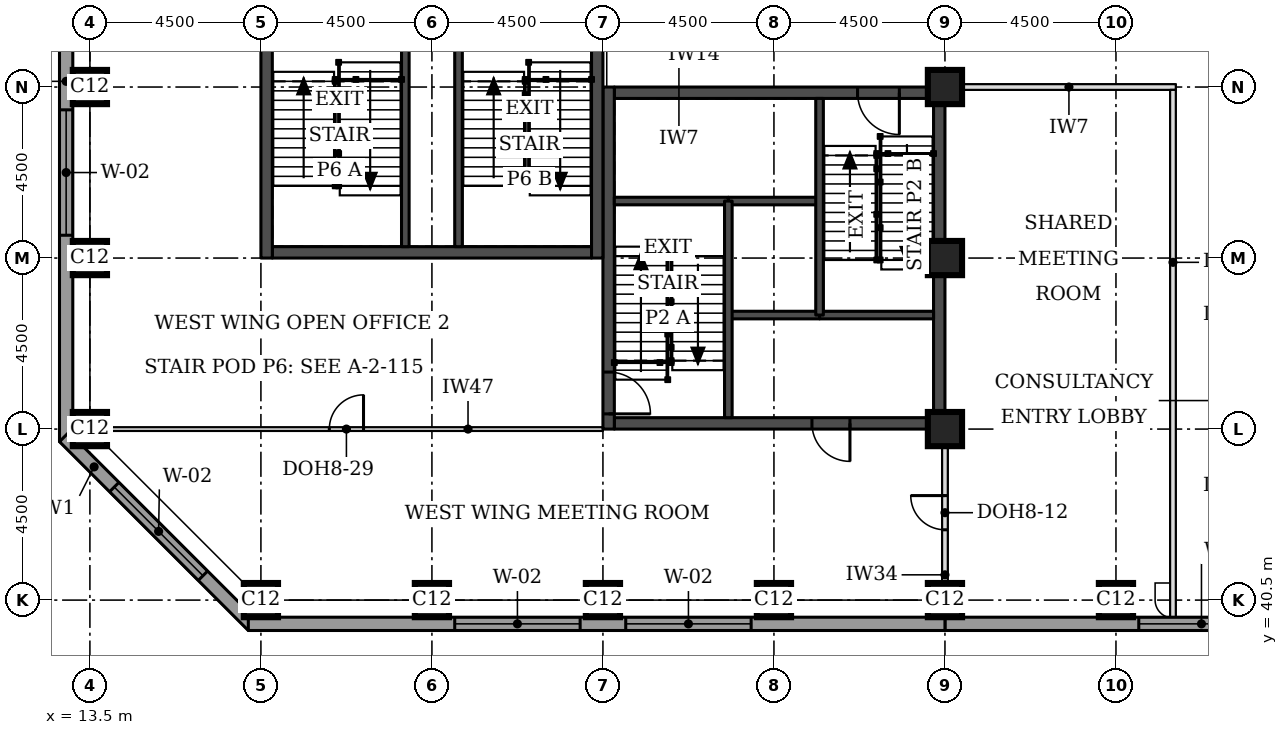
"""IFC4 building model, lengths in metres.
Left out: names, types, materials, properties, quantities, classifications, styles, units other than length and angle.
Written with IfcOpenShell. Run it as: python <this file> out.ifc"""

import sys

from ifc_helpers import new_model, si_unit, direction, frame, frame_2d, origin, origin_2d, place, context, subcontext, project, spatial, rectangle, extrude, element, fill, save


model = new_model("IFC4")
c1 = context("Model", 3, precision=1e-05, world=origin(), true_north=direction((0.0, 1.0)))
c2 = subcontext(c1, "Body", "Model", "MODEL_VIEW")
j1 = project(units=[si_unit("LENGTHUNIT", "METRE"), si_unit("PLANEANGLEUNIT", "RADIAN")], contexts=[c1])
p1 = place(None, origin())
s1 = spatial("IfcSite", under=j1, at=p1, CompositionType="ELEMENT")
p2 = place(p1, origin())
s2 = spatial("IfcBuilding", under=s1, at=p2, CompositionType="ELEMENT")
p3 = place(p2, frame((0.0, 0.0, 203.2)))
s3 = spatial("IfcBuildingStorey", under=s2, at=p3, CompositionType="ELEMENT", Elevation=203.2)
for number, where, z_axis, x_axis in (
    (1, (18.0, 40.5, 0.0), (0.0, 0.0, 1.0), (1.0, 0.0, 0.0)),
    (2, (22.5, 40.5, 0.0), (0.0, 0.0, 1.0), (1.0, 0.0, 0.0)),
    (3, (27.0, 40.5, 0.0), (0.0, 0.0, 1.0), (1.0, 0.0, 0.0)),
    (4, (31.5, 40.5, 0.0), (0.0, 0.0, 1.0), (1.0, 0.0, 0.0)),
    (5, (36.0, 40.5, 0.0), (0.0, 0.0, 1.0), (1.0, 0.0, 0.0)),
    (6, (40.5, 40.5, 0.0), (0.0, 0.0, 1.0), (1.0, 0.0, 0.0)),
    (7, (13.5, 45.0, 0.0), (0.0, 0.0, 1.0), (1.0, 0.0, 0.0)),
    (8, (36.0, 45.0, 0.0), (0.0, 0.0, 1.0), (1.0, 0.0, 0.0)),
    (9, (13.5, 49.5, 0.0), (0.0, 0.0, 1.0), (1.0, 0.0, 0.0)),
    (10, (36.0, 49.5, 0.0), (0.0, 0.0, 1.0), (1.0, 0.0, 0.0)),
    (11, (13.5, 54.0, 0.0), (0.0, 0.0, 1.0), (1.0, 0.0, 0.0)),
    (12, (36.0, 54.0, 0.0), (0.0, 0.0, 1.0), (1.0, 0.0, 0.0)),
):
    element("IfcColumn", number, at=place(p3, frame(where, z_axis=z_axis, x_axis=x_axis)), inside=s3, PredefinedType="COLUMN", context=c2, shape_type="SweptSolid", body=[
        extrude(rectangle(XDim=0.9, YDim=0.9, at=origin_2d()), origin(), (0.0, 0.0, 1.0), 3.7),
    ])
p4 = place(p3, frame((27.3, 45.15, 0.0), z_axis=(0.0, 0.0, 1.0), x_axis=(1.0, 0.0, 0.0)))
e13 = element("IfcWall", 13, at=p4, inside=s3, PredefinedType="SHEAR", context=c2, shape_type="SweptSolid", body=[
    extrude(rectangle(XDim=8.4, YDim=0.3, at=frame_2d((4.2, 0.0))), origin(), (0.0, 0.0, 1.0), 3.7),
])
p5 = place(p4, frame((5.2, 0.0, 0.0)))
e14 = element("IfcOpeningElement", 14, at=p5, cuts=e13, PredefinedType="OPENING", context=c2, shape_type="SweptSolid", body=[
    extrude(rectangle(XDim=1.0, YDim=2.1, at=frame_2d((0.5, 1.05))), frame((0.0, 0.16, 0.0), z_axis=(0.0, -1.0, 0.0), x_axis=(1.0, 0.0, 0.0)), (0.0, 0.0, 1.0), 0.32),
])
p6 = place(p3, frame((27.3, 53.85, 0.0), z_axis=(0.0, 0.0, 1.0), x_axis=(1.0, 0.0, 0.0)))
e15 = element("IfcWall", 15, at=p6, inside=s3, PredefinedType="SHEAR", context=c2, shape_type="SweptSolid", body=[
    extrude(rectangle(XDim=8.4, YDim=0.3, at=frame_2d((4.2, 0.0))), origin(), (0.0, 0.0, 1.0), 3.7),
])
p7 = place(p6, frame((6.4, 0.0, 0.0)))
e16 = element("IfcOpeningElement", 16, at=p7, cuts=e15, PredefinedType="OPENING", context=c2, shape_type="SweptSolid", body=[
    extrude(rectangle(XDim=1.1, YDim=2.1, at=frame_2d((0.55, 1.05))), frame((0.0, 0.16, 0.0), z_axis=(0.0, -1.0, 0.0), x_axis=(1.0, 0.0, 0.0)), (0.0, 0.0, 1.0), 0.32),
])
p8 = place(p3, frame((27.15, 45.0, 0.0), z_axis=(0.0, 0.0, 1.0), x_axis=(0.0, 1.0, 0.0)))
e17 = element("IfcWall", 17, at=p8, inside=s3, PredefinedType="SHEAR", context=c2, shape_type="SweptSolid", body=[
    extrude(rectangle(XDim=9.0, YDim=0.3, at=frame_2d((4.5, 0.0))), origin(), (0.0, 0.0, 1.0), 3.7),
])
p9 = place(p8, frame((0.4, 0.0, 0.0)))
e18 = element("IfcOpeningElement", 18, at=p9, cuts=e17, PredefinedType="OPENING", context=c2, shape_type="SweptSolid", body=[
    extrude(rectangle(XDim=1.1, YDim=2.1, at=frame_2d((0.55, 1.05))), frame((0.0, 0.16, 0.0), z_axis=(0.0, -1.0, 0.0), x_axis=(1.0, 0.0, 0.0)), (0.0, 0.0, 1.0), 0.32),
])
p10 = place(p3, frame((35.85, 45.0, 0.0), z_axis=(0.0, 0.0, 1.0), x_axis=(0.0, 1.0, 0.0)))
e19 = element("IfcWall", 19, at=p10, inside=s3, PredefinedType="SHEAR", context=c2, shape_type="SweptSolid", body=[
    extrude(rectangle(XDim=9.0, YDim=0.3, at=frame_2d((4.5, 0.0))), origin(), (0.0, 0.0, 1.0), 3.7),
])
p11 = place(p3, frame((18.3, 49.65, 0.0), z_axis=(0.0, 0.0, 1.0), x_axis=(1.0, 0.0, 0.0)))
e20 = element("IfcWall", 20, at=p11, inside=s3, PredefinedType="SHEAR", context=c2, shape_type="SweptSolid", body=[
    extrude(rectangle(XDim=8.4, YDim=0.3, at=frame_2d((4.2, 0.0))), origin(), (0.0, 0.0, 1.0), 3.7),
])
p12 = place(p3, frame((18.15, 49.5, 0.0), z_axis=(0.0, 0.0, 1.0), x_axis=(0.0, 1.0, 0.0)))
e21 = element("IfcWall", 21, at=p12, inside=s3, PredefinedType="SHEAR", context=c2, shape_type="SweptSolid", body=[
    extrude(rectangle(XDim=9.0, YDim=0.3, at=frame_2d((4.5, 0.0))), origin(), (0.0, 0.0, 1.0), 3.7),
])
p13 = place(p3, frame((26.85, 49.5, 0.0), z_axis=(0.0, 0.0, 1.0), x_axis=(0.0, 1.0, 0.0)))
e22 = element("IfcWall", 22, at=p13, inside=s3, PredefinedType="SHEAR", context=c2, shape_type="SweptSolid", body=[
    extrude(rectangle(XDim=9.0, YDim=0.3, at=frame_2d((4.5, 0.0))), origin(), (0.0, 0.0, 1.0), 3.7),
])
p14 = place(p13, frame((6.6, 0.0, 0.0)))
e23 = element("IfcOpeningElement", 23, at=p14, cuts=e22, PredefinedType="OPENING", context=c2, shape_type="SweptSolid", body=[
    extrude(rectangle(XDim=1.8, YDim=2.1, at=frame_2d((0.9, 1.05))), frame((0.0, 0.16, 0.0), z_axis=(0.0, -1.0, 0.0), x_axis=(1.0, 0.0, 0.0)), (0.0, 0.0, 1.0), 0.32),
])
p15 = place(p3, frame((36.0, 39.875, 0.0), z_axis=(0.0, 0.0, 1.0), x_axis=(1.0, 0.0, 0.0)))
e24 = element("IfcWall", 24, at=p15, inside=s3, PredefinedType="STANDARD", context=c2, shape_type="SweptSolid", body=[
    extrude(rectangle(XDim=36.331, YDim=0.35, at=frame_2d((18.166, 0.0))), origin(), (0.0, 0.0, 1.0), 3.525),
])
p16 = place(p15, frame((5.1, 0.0, 0.9)))
e25 = element("IfcOpeningElement", 25, at=p16, cuts=e24, PredefinedType="OPENING", context=c2, shape_type="SweptSolid", body=[
    extrude(rectangle(XDim=3.3, YDim=1.9, at=frame_2d((1.65, 0.95))), frame((0.0, 0.185, 0.0), z_axis=(0.0, -1.0, 0.0), x_axis=(1.0, 0.0, 0.0)), (0.0, 0.0, 1.0), 0.37),
])
p17 = place(p15, frame((9.6, 0.0, 0.9)))
e26 = element("IfcOpeningElement", 26, at=p17, cuts=e24, PredefinedType="OPENING", context=c2, shape_type="SweptSolid", body=[
    extrude(rectangle(XDim=3.3, YDim=1.9, at=frame_2d((1.65, 0.95))), frame((0.0, 0.185, 0.0), z_axis=(0.0, -1.0, 0.0), x_axis=(1.0, 0.0, 0.0)), (0.0, 0.0, 1.0), 0.37),
])
p18 = place(p15, frame((14.1, 0.0, 0.9)))
e27 = element("IfcOpeningElement", 27, at=p18, cuts=e24, PredefinedType="OPENING", context=c2, shape_type="SweptSolid", body=[
    extrude(rectangle(XDim=3.3, YDim=1.9, at=frame_2d((1.65, 0.95))), frame((0.0, 0.185, 0.0), z_axis=(0.0, -1.0, 0.0), x_axis=(1.0, 0.0, 0.0)), (0.0, 0.0, 1.0), 0.37),
])
p19 = place(p15, frame((18.6, 0.0, 0.9)))
e28 = element("IfcOpeningElement", 28, at=p19, cuts=e24, PredefinedType="OPENING", context=c2, shape_type="SweptSolid", body=[
    extrude(rectangle(XDim=3.3, YDim=1.9, at=frame_2d((1.65, 0.95))), frame((0.0, 0.185, 0.0), z_axis=(0.0, -1.0, 0.0), x_axis=(1.0, 0.0, 0.0)), (0.0, 0.0, 1.0), 0.37),
])
p20 = place(p15, frame((23.1, 0.0, 0.9)))
e29 = element("IfcOpeningElement", 29, at=p20, cuts=e24, PredefinedType="OPENING", context=c2, shape_type="SweptSolid", body=[
    extrude(rectangle(XDim=3.3, YDim=1.9, at=frame_2d((1.65, 0.95))), frame((0.0, 0.185, 0.0), z_axis=(0.0, -1.0, 0.0), x_axis=(1.0, 0.0, 0.0)), (0.0, 0.0, 1.0), 0.37),
])
p21 = place(p15, frame((27.6, 0.0, 0.9)))
e30 = element("IfcOpeningElement", 30, at=p21, cuts=e24, PredefinedType="OPENING", context=c2, shape_type="SweptSolid", body=[
    extrude(rectangle(XDim=3.3, YDim=1.9, at=frame_2d((1.65, 0.95))), frame((0.0, 0.185, 0.0), z_axis=(0.0, -1.0, 0.0), x_axis=(1.0, 0.0, 0.0)), (0.0, 0.0, 1.0), 0.37),
])
p22 = place(p3, frame((12.875, 58.831, 0.0), z_axis=(0.0, 0.0, 1.0), x_axis=(0.0, -1.0, 0.0)))
e31 = element("IfcWall", 31, at=p22, inside=s3, PredefinedType="STANDARD", context=c2, shape_type="SweptSolid", body=[
    extrude(rectangle(XDim=14.163, YDim=0.35, at=frame_2d((7.081, 0.0))), origin(), (0.0, 0.0, 1.0), 3.525),
])
p23 = place(p22, frame((5.431, 0.0, 0.9)))
e32 = element("IfcOpeningElement", 32, at=p23, cuts=e31, PredefinedType="OPENING", context=c2, shape_type="SweptSolid", body=[
    extrude(rectangle(XDim=3.3, YDim=1.9, at=frame_2d((1.65, 0.95))), frame((0.0, 0.185, 0.0), z_axis=(0.0, -1.0, 0.0), x_axis=(1.0, 0.0, 0.0)), (0.0, 0.0, 1.0), 0.37),
])
p24 = place(p3, frame((12.824, 44.792, 0.0), z_axis=(0.0, 0.0, 1.0), x_axis=(0.707106781187, -0.707106781187, 0.0)))
e33 = element("IfcWall", 33, at=p24, inside=s3, PredefinedType="STANDARD", context=c2, shape_type="SweptSolid", body=[
    extrude(rectangle(XDim=7.027, YDim=0.35, at=frame_2d((3.513, 0.0))), origin(), (0.0, 0.0, 1.0), 3.525),
])
p25 = place(p24, frame((1.863, 0.0, 0.9)))
e34 = element("IfcOpeningElement", 34, at=p25, cuts=e33, PredefinedType="OPENING", context=c2, shape_type="SweptSolid", body=[
    extrude(rectangle(XDim=3.3, YDim=1.9, at=frame_2d((1.65, 0.95))), frame((0.0, 0.185, 0.0), z_axis=(0.0, -1.0, 0.0), x_axis=(1.0, 0.0, 0.0)), (0.0, 0.0, 1.0), 0.37),
])
p26 = place(p3, frame((17.669, 39.875, 0.0), z_axis=(0.0, 0.0, 1.0), x_axis=(1.0, 0.0, 0.0)))
e35 = element("IfcWall", 35, at=p26, inside=s3, PredefinedType="STANDARD", context=c2, shape_type="SweptSolid", body=[
    extrude(rectangle(XDim=18.331, YDim=0.35, at=frame_2d((9.166, 0.0))), origin(), (0.0, 0.0, 1.0), 3.525),
])
p27 = place(p26, frame((5.431, 0.0, 0.9)))
e36 = element("IfcOpeningElement", 36, at=p27, cuts=e35, PredefinedType="OPENING", context=c2, shape_type="SweptSolid", body=[
    extrude(rectangle(XDim=3.3, YDim=1.9, at=frame_2d((1.65, 0.95))), frame((0.0, 0.185, 0.0), z_axis=(0.0, -1.0, 0.0), x_axis=(1.0, 0.0, 0.0)), (0.0, 0.0, 1.0), 0.37),
])
p28 = place(p26, frame((9.931, 0.0, 0.9)))
e37 = element("IfcOpeningElement", 37, at=p28, cuts=e35, PredefinedType="OPENING", context=c2, shape_type="SweptSolid", body=[
    extrude(rectangle(XDim=3.3, YDim=1.9, at=frame_2d((1.65, 0.95))), frame((0.0, 0.185, 0.0), z_axis=(0.0, -1.0, 0.0), x_axis=(1.0, 0.0, 0.0)), (0.0, 0.0, 1.0), 0.37),
])
p29 = place(p3, frame((36.45, 54.0, 0.0), z_axis=(0.0, 0.0, 1.0), x_axis=(1.0, 0.0, 0.0)))
e38 = element("IfcWall", 38, at=p29, inside=s3, PredefinedType="PARTITIONING", context=c2, shape_type="SweptSolid", body=[
    extrude(rectangle(XDim=5.625, YDim=0.15, at=frame_2d((2.812, 0.0))), origin(), (0.0, 0.0, 1.0), 3.55),
])
p30 = place(p3, frame((42.0, 40.05, 0.0), z_axis=(0.0, 0.0, 1.0), x_axis=(0.0, 1.0, 0.0)))
e39 = element("IfcWall", 39, at=p30, inside=s3, PredefinedType="PARTITIONING", context=c2, shape_type="SweptSolid", body=[
    extrude(rectangle(XDim=13.875, YDim=0.15, at=frame_2d((6.938, 0.0))), origin(), (0.0, 0.0, 1.0), 3.55),
])
p31 = place(p3, frame((36.0, 40.95, 0.0), z_axis=(0.0, 0.0, 1.0), x_axis=(0.0, 1.0, 0.0)))
e40 = element("IfcWall", 40, at=p31, inside=s3, PredefinedType="PARTITIONING", context=c2, shape_type="SweptSolid", body=[
    extrude(rectangle(XDim=3.63, YDim=0.15, at=frame_2d((1.815, 0.0))), origin(), (0.0, 0.0, 1.0), 2.8),
])
p32 = place(p31, frame((1.4, 0.0, 0.0)))
e41 = element("IfcOpeningElement", 41, at=p32, cuts=e40, PredefinedType="OPENING", context=c2, shape_type="SweptSolid", body=[
    extrude(rectangle(XDim=0.9, YDim=2.1, at=frame_2d((0.45, 1.05))), frame((0.0, 0.085, 0.0), z_axis=(0.0, -1.0, 0.0), x_axis=(1.0, 0.0, 0.0)), (0.0, 0.0, 1.0), 0.17),
])
p33 = place(p3, frame((27.0, 45.0, 0.0), z_axis=(0.0, 0.0, 1.0), x_axis=(-1.0, 0.0, 0.0)))
e42 = element("IfcWall", 42, at=p33, inside=s3, PredefinedType="PARTITIONING", context=c2, shape_type="SweptSolid", body=[
    extrude(rectangle(XDim=13.5, YDim=0.1, at=frame_2d((6.75, 0.0))), origin(), (0.0, 0.0, 1.0), 2.55),
])
p34 = place(p33, frame((6.3, 0.0, 0.0)))
e43 = element("IfcOpeningElement", 43, at=p34, cuts=e42, PredefinedType="OPENING", context=c2, shape_type="SweptSolid", body=[
    extrude(rectangle(XDim=0.9, YDim=2.1, at=frame_2d((0.45, 1.05))), frame((0.0, 0.06, 0.0), z_axis=(0.0, -1.0, 0.0), x_axis=(1.0, 0.0, 0.0)), (0.0, 0.0, 1.0), 0.12),
])
p35 = place(p3, frame((30.3, 48.0, 0.0), z_axis=(0.0, 0.0, 1.0), x_axis=(1.0, 0.0, 0.0)))
e44 = element("IfcWall", 44, at=p35, inside=s3, PredefinedType="SOLIDWALL", context=c2, shape_type="SweptSolid", body=[
    extrude(rectangle(XDim=2.4, YDim=0.2, at=frame_2d((1.2, 0.0))), origin(), (0.0, 0.0, 1.0), 3.55),
])
p36 = place(p3, frame((32.7, 48.0, 0.0), z_axis=(0.0, 0.0, 1.0), x_axis=(1.0, 0.0, 0.0)))
e45 = element("IfcWall", 45, at=p36, inside=s3, PredefinedType="SOLIDWALL", context=c2, shape_type="SweptSolid", body=[
    extrude(rectangle(XDim=3.0, YDim=0.2, at=frame_2d((1.5, 0.0))), origin(), (0.0, 0.0, 1.0), 3.55),
])
p37 = place(p3, frame((30.3, 51.0, 0.0), z_axis=(0.0, 0.0, 1.0), x_axis=(1.0, 0.0, 0.0)))
e46 = element("IfcWall", 46, at=p37, inside=s3, PredefinedType="SOLIDWALL", context=c2, shape_type="SweptSolid", body=[
    extrude(rectangle(XDim=2.4, YDim=0.2, at=frame_2d((1.2, 0.0))), origin(), (0.0, 0.0, 1.0), 3.7),
])
p38 = place(p3, frame((27.3, 51.0, 0.0), z_axis=(0.0, 0.0, 1.0), x_axis=(1.0, 0.0, 0.0)))
e47 = element("IfcWall", 47, at=p38, inside=s3, PredefinedType="SOLIDWALL", context=c2, shape_type="SweptSolid", body=[
    extrude(rectangle(XDim=3.0, YDim=0.2, at=frame_2d((1.5, 0.0))), origin(), (0.0, 0.0, 1.0), 3.55),
])
for number, where, z_axis, x_axis in (
    (48, (30.3, 45.3, 0.0), (0.0, 0.0, 1.0), (0.0, 1.0, 0.0)),
    (49, (32.7, 48.0, 0.0), (0.0, 0.0, 1.0), (0.0, 1.0, 0.0)),
):
    element("IfcWall", number, at=place(p3, frame(where, z_axis=z_axis, x_axis=x_axis)), inside=s3, PredefinedType="SOLIDWALL", context=c2, shape_type="SweptSolid", body=[
        extrude(rectangle(XDim=5.7, YDim=0.2, at=frame_2d((2.85, 0.0))), origin(), (0.0, 0.0, 1.0), 3.55),
    ])
for number, where, z_axis, x_axis in (
    (50, (21.8, 49.8, 0.0), (0.0, 0.0, 1.0), (0.0, 1.0, 0.0)),
    (51, (23.2, 49.8, 0.0), (0.0, 0.0, 1.0), (0.0, 1.0, 0.0)),
):
    element("IfcWall", number, at=place(p3, frame(where, z_axis=z_axis, x_axis=x_axis)), inside=s3, PredefinedType="SOLIDWALL", context=c2, shape_type="SweptSolid", body=[
        extrude(rectangle(XDim=6.05, YDim=0.2, at=frame_2d((3.025, 0.0))), origin(), (0.0, 0.0, 1.0), 3.55),
    ])
p39 = place(p16, origin())
e52 = element("IfcWindow", 52, at=p39, inside=s3, PartitioningType="SINGLE_PANEL", PredefinedType="WINDOW", context=c2, shape_type="SweptSolid", body=[
    extrude(rectangle(XDim=3.3, YDim=1.9, at=frame_2d((1.65, 0.95))), frame((0.0, 0.085, 0.0), z_axis=(0.0, -1.0, 0.0), x_axis=(1.0, 0.0, 0.0)), (0.0, 0.0, 1.0), 0.06),
])
fill(e25, e52)
p40 = place(p23, origin())
e53 = element("IfcWindow", 53, at=p40, inside=s3, PartitioningType="SINGLE_PANEL", PredefinedType="WINDOW", context=c2, shape_type="SweptSolid", body=[
    extrude(rectangle(XDim=3.3, YDim=1.9, at=frame_2d((1.65, 0.95))), frame((0.0, 0.085, 0.0), z_axis=(0.0, -1.0, 0.0), x_axis=(1.0, 0.0, 0.0)), (0.0, 0.0, 1.0), 0.06),
])
fill(e32, e53)
p41 = place(p25, origin())
e54 = element("IfcWindow", 54, at=p41, inside=s3, PartitioningType="SINGLE_PANEL", PredefinedType="WINDOW", context=c2, shape_type="SweptSolid", body=[
    extrude(rectangle(XDim=3.3, YDim=1.9, at=frame_2d((1.65, 0.95))), frame((0.0, 0.085, 0.0), z_axis=(0.0, -1.0, 0.0), x_axis=(1.0, 0.0, 0.0)), (0.0, 0.0, 1.0), 0.06),
])
fill(e34, e54)
p42 = place(p27, origin())
e55 = element("IfcWindow", 55, at=p42, inside=s3, PartitioningType="SINGLE_PANEL", PredefinedType="WINDOW", context=c2, shape_type="SweptSolid", body=[
    extrude(rectangle(XDim=3.3, YDim=1.9, at=frame_2d((1.65, 0.95))), frame((0.0, 0.085, 0.0), z_axis=(0.0, -1.0, 0.0), x_axis=(1.0, 0.0, 0.0)), (0.0, 0.0, 1.0), 0.06),
])
fill(e36, e55)
p43 = place(p28, origin())
e56 = element("IfcWindow", 56, at=p43, inside=s3, PartitioningType="SINGLE_PANEL", PredefinedType="WINDOW", context=c2, shape_type="SweptSolid", body=[
    extrude(rectangle(XDim=3.3, YDim=1.9, at=frame_2d((1.65, 0.95))), frame((0.0, 0.085, 0.0), z_axis=(0.0, -1.0, 0.0), x_axis=(1.0, 0.0, 0.0)), (0.0, 0.0, 1.0), 0.06),
])
fill(e37, e56)
p44 = place(p32, origin())
e57 = element("IfcDoor", 57, at=p44, inside=s3, OperationType="SINGLE_SWING_RIGHT", PredefinedType="DOOR", context=c2, shape_type="SweptSolid", body=[
    extrude(rectangle(XDim=0.9, YDim=2.1, at=frame_2d((0.45, 1.05))), frame((0.0, 0.025, 0.0), z_axis=(0.0, -1.0, 0.0), x_axis=(1.0, 0.0, 0.0)), (0.0, 0.0, 1.0), 0.05),
])
fill(e41, e57)
p45 = place(p34, frame((0.9, 0.0, 0.0), z_axis=(0.0, 0.0, 1.0), x_axis=(-1.0, 0.0, 0.0)))
e58 = element("IfcDoor", 58, at=p45, inside=s3, OperationType="SINGLE_SWING_RIGHT", PredefinedType="DOOR", context=c2, shape_type="SweptSolid", body=[
    extrude(rectangle(XDim=0.9, YDim=2.1, at=frame_2d((0.45, 1.05))), frame((0.0, 0.025, 0.0), z_axis=(0.0, -1.0, 0.0), x_axis=(1.0, 0.0, 0.0)), (0.0, 0.0, 1.0), 0.05),
])
fill(e43, e58)
p46 = place(p9, frame((1.1, 0.0, 0.0), z_axis=(0.0, 0.0, 1.0), x_axis=(-1.0, 0.0, 0.0)))
e59 = element("IfcDoor", 59, at=p46, inside=s3, OperationType="SINGLE_SWING_RIGHT", PredefinedType="DOOR", context=c2, shape_type="SweptSolid", body=[
    extrude(rectangle(XDim=1.1, YDim=2.1, at=frame_2d((0.55, 1.05))), frame((0.0, 0.025, 0.0), z_axis=(0.0, -1.0, 0.0), x_axis=(1.0, 0.0, 0.0)), (0.0, 0.0, 1.0), 0.05),
])
fill(e18, e59)
p47 = place(p7, frame((1.1, 0.0, 0.0), z_axis=(0.0, 0.0, 1.0), x_axis=(-1.0, 0.0, 0.0)))
e60 = element("IfcDoor", 60, at=p47, inside=s3, OperationType="SINGLE_SWING_LEFT", PredefinedType="DOOR", context=c2, shape_type="SweptSolid", body=[
    extrude(rectangle(XDim=1.1, YDim=2.1, at=frame_2d((0.55, 1.05))), frame((0.0, 0.025, 0.0), z_axis=(0.0, -1.0, 0.0), x_axis=(1.0, 0.0, 0.0)), (0.0, 0.0, 1.0), 0.05),
])
fill(e16, e60)
p48 = place(p5, frame((1.0, 0.0, 0.0), z_axis=(0.0, 0.0, 1.0), x_axis=(-1.0, 0.0, 0.0)))
e61 = element("IfcDoor", 61, at=p48, inside=s3, OperationType="SINGLE_SWING_LEFT", PredefinedType="DOOR", context=c2, shape_type="SweptSolid", body=[
    extrude(rectangle(XDim=1.0, YDim=2.1, at=frame_2d((0.5, 1.05))), frame((0.0, 0.025, 0.0), z_axis=(0.0, -1.0, 0.0), x_axis=(1.0, 0.0, 0.0)), (0.0, 0.0, 1.0), 0.05),
])
fill(e14, e61)
save(model, sys.argv[1])
